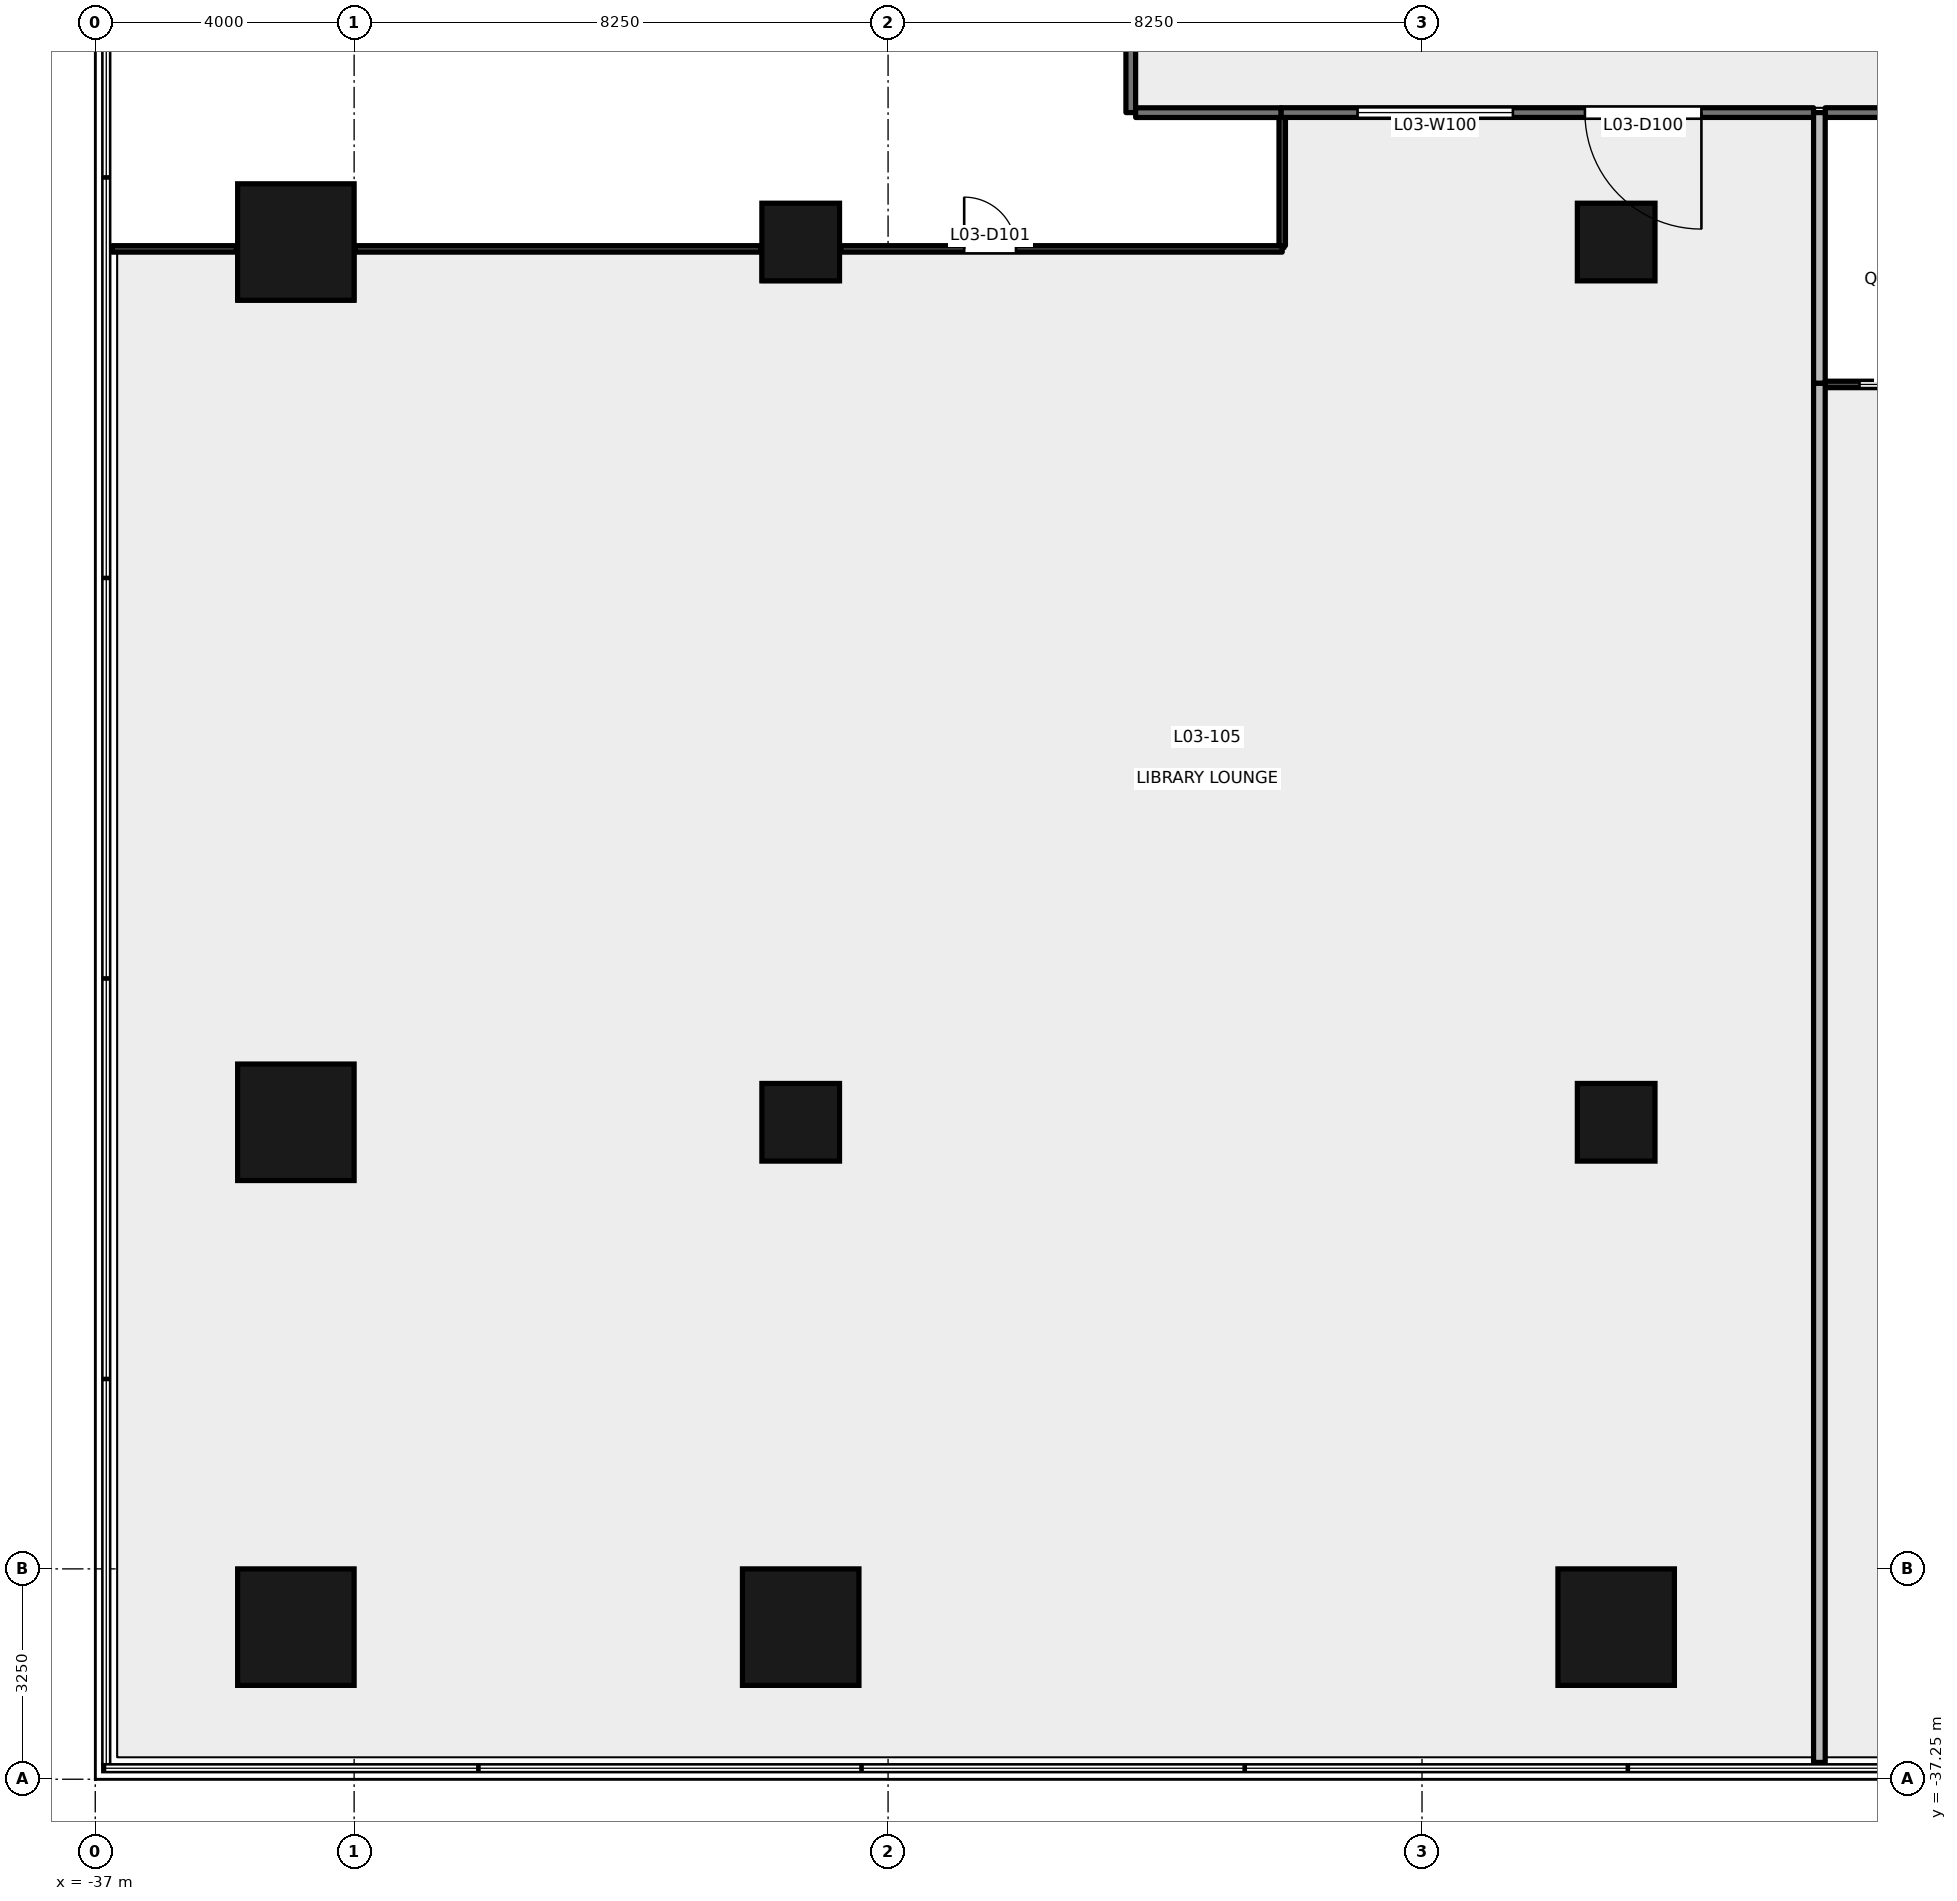
"""IFC4 building model, lengths in metres.
Left out: names, types, materials, properties, quantities, classifications, styles, units other than length and angle.
Written with IfcOpenShell. Run it as: python <this file> out.ifc"""

import sys

from ifc_helpers import new_model, si_unit, direction, frame, frame_2d, origin, origin_2d, place, context, subcontext, project, spatial, rectangle, extrude, element, fill, save


model = new_model("IFC4")
c1 = context("Model", 3, precision=1e-05, world=origin(), true_north=direction((0.0, 1.0)))
c2 = subcontext(c1, "Body", "Model", "MODEL_VIEW")
j1 = project(units=[si_unit("LENGTHUNIT", "METRE"), si_unit("PLANEANGLEUNIT", "RADIAN")], contexts=[c1])
p1 = place(None, origin())
s1 = spatial("IfcSite", under=j1, at=p1, CompositionType="ELEMENT")
p2 = place(p1, origin())
s2 = spatial("IfcBuilding", under=s1, at=p2, CompositionType="ELEMENT")
p3 = place(p2, frame((0.0, 0.0, 17.4)))
s3 = spatial("IfcBuildingStorey", under=s2, at=p3, CompositionType="ELEMENT", Elevation=17.4)
for number, where, z_axis, x_axis in (
    (1, (-33.9, -34.9, -0.2), (0.0, 0.0, 1.0), (1.0, 0.0, 0.0)),
    (2, (-26.1, -34.9, -0.2), (0.0, 0.0, 1.0), (1.0, 0.0, 0.0)),
    (3, (-13.5, -34.9, -0.2), (0.0, 0.0, 1.0), (1.0, 0.0, 0.0)),
    (4, (-33.9, -27.1, -0.2), (0.0, 0.0, 1.0), (0.0, 1.0, 0.0)),
    (5, (-33.9, -13.5, -0.2), (0.0, 0.0, 1.0), (0.0, 1.0, 0.0)),
):
    element("IfcColumn", number, at=place(p3, frame(where, z_axis=z_axis, x_axis=x_axis)), inside=s3, PredefinedType="COLUMN", context=c2, shape_type="SweptSolid", body=[
        extrude(rectangle(XDim=1.8, YDim=1.8, at=origin_2d()), origin(), (0.0, 0.0, 1.0), 4.8),
    ])
for number, where, z_axis, x_axis in (
    (6, (-26.1, -27.1, -0.2), (0.0, 0.0, 1.0), (1.0, 0.0, 0.0)),
    (7, (-13.5, -27.1, -0.2), (0.0, 0.0, 1.0), (1.0, 0.0, 0.0)),
    (8, (-26.1, -13.5, -0.2), (0.0, 0.0, 1.0), (1.0, 0.0, 0.0)),
    (9, (-13.5, -13.5, -0.2), (0.0, 0.0, 1.0), (1.0, 0.0, 0.0)),
):
    element("IfcColumn", number, at=place(p3, frame(where, z_axis=z_axis, x_axis=x_axis)), inside=s3, PredefinedType="COLUMN", context=c2, shape_type="SweptSolid", body=[
        extrude(rectangle(XDim=1.2, YDim=1.2, at=origin_2d()), origin(), (0.0, 0.0, 1.0), 4.8),
    ])
p4 = place(p3, frame((-10.45, -11.5, 0.0), z_axis=(0.0, 0.0, 1.0), x_axis=(-1.0, 0.0, 0.0)))
e10 = element("IfcWall", 10, at=p4, inside=s3, PredefinedType="PARTITIONING", context=c2, shape_type="SweptSolid", body=[
    extrude(rectangle(XDim=8.23, YDim=0.15, at=frame_2d((4.115, 0.0))), origin(), (0.0, 0.0, 1.0), 3.2),
])
p5 = place(p4, frame((1.733, 0.0, 0.0)))
e11 = element("IfcOpeningElement", 11, at=p5, cuts=e10, PredefinedType="OPENING", context=c2, shape_type="SweptSolid", body=[
    extrude(rectangle(XDim=1.8, YDim=2.1, at=frame_2d((0.9, 1.05))), frame((0.0, 0.085, 0.0), z_axis=(0.0, -1.0, 0.0), x_axis=(1.0, 0.0, 0.0)), (0.0, 0.0, 1.0), 0.171),
])
p6 = place(p4, frame((4.646, 0.0, 0.0)))
e12 = element("IfcOpeningElement", 12, at=p6, cuts=e10, PredefinedType="OPENING", context=c2, shape_type="SweptSolid", body=[
    extrude(rectangle(XDim=2.4, YDim=2.4, at=frame_2d((1.2, 1.2))), frame((0.0, 0.085, 0.0), z_axis=(0.0, -1.0, 0.0), x_axis=(1.0, 0.0, 0.0)), (0.0, 0.0, 1.0), 0.171),
])
p7 = place(p3, frame((-21.0, -11.5, 0.0), z_axis=(0.0, 0.0, 1.0), x_axis=(0.0, 1.0, 0.0)))
e13 = element("IfcWall", 13, at=p7, inside=s3, PredefinedType="PARTITIONING", context=c2, shape_type="SweptSolid", body=[
    extrude(rectangle(XDim=4.1, YDim=0.15, at=frame_2d((2.05, 0.0))), origin(), (0.0, 0.0, 1.0), 4.6),
])
p8 = place(p3, frame((-18.68, -11.501, 0.0), z_axis=(0.0, 0.0, 1.0), x_axis=(-1.0, 0.0, 0.0)))
e14 = element("IfcWall", 14, at=p8, inside=s3, PredefinedType="PARTITIONING", context=c2, shape_type="SweptSolid", body=[
    extrude(rectangle(XDim=2.245, YDim=0.15, at=frame_2d((1.123, 0.0))), origin(), (0.0, 0.0, 1.0), 4.6),
])
p9 = place(p3, frame((-7.38, -11.5, 0.0), z_axis=(0.0, 0.0, 1.0), x_axis=(-1.0, 0.0, 0.0)))
e15 = element("IfcWall", 15, at=p9, inside=s3, PredefinedType="PARTITIONING", context=c2, shape_type="SweptSolid", body=[
    extrude(rectangle(XDim=2.89, YDim=0.15, at=frame_2d((1.445, 0.0))), origin(), (0.0, 0.0, 1.0), 4.3),
])
p10 = place(p3, frame((-36.74, -13.606, 0.0), z_axis=(0.0, 0.0, 1.0), x_axis=(1.0, 0.0, 0.0)))
e16 = element("IfcWall", 16, at=p10, inside=s3, PredefinedType="PARTITIONING", context=c2, shape_type="SweptSolid", body=[
    extrude(rectangle(XDim=1.92, YDim=0.1, at=frame_2d((0.96, 0.0))), origin(), (0.0, 0.0, 1.0), 4.6),
])
p11 = place(p3, frame((-32.98, -13.606, 0.0), z_axis=(0.0, 0.0, 1.0), x_axis=(1.0, 0.0, 0.0)))
e17 = element("IfcWall", 17, at=p11, inside=s3, PredefinedType="PARTITIONING", context=c2, shape_type="SweptSolid", body=[
    extrude(rectangle(XDim=6.26, YDim=0.1, at=frame_2d((3.13, 0.0))), origin(), (0.0, 0.0, 1.0), 3.6),
])
p12 = place(p3, frame((-25.48, -13.606, 0.0), z_axis=(0.0, 0.0, 1.0), x_axis=(1.0, 0.0, 0.0)))
e18 = element("IfcWall", 18, at=p12, inside=s3, PredefinedType="PARTITIONING", context=c2, shape_type="SweptSolid", body=[
    extrude(rectangle(XDim=6.82, YDim=0.1, at=frame_2d((3.41, 0.0))), origin(), (0.0, 0.0, 1.0), 3.6),
])
p13 = place(p12, frame((1.906, 0.0, 0.0)))
e19 = element("IfcOpeningElement", 19, at=p13, cuts=e18, PredefinedType="OPENING", context=c2, shape_type="SweptSolid", body=[
    extrude(rectangle(XDim=0.8, YDim=2.1, at=frame_2d((0.4, 1.05))), frame((0.0, 0.061, 0.0), z_axis=(0.0, -1.0, 0.0), x_axis=(1.0, 0.0, 0.0)), (0.0, 0.0, 1.0), 0.121),
])
p14 = place(p3, frame((-18.66, -13.556, 0.0), z_axis=(0.0, 0.0, 1.0), x_axis=(0.0, 1.0, 0.0)))
e20 = element("IfcWall", 20, at=p14, inside=s3, PredefinedType="PARTITIONING", context=c2, shape_type="SweptSolid", body=[
    extrude(rectangle(XDim=1.981, YDim=0.1, at=frame_2d((0.99, 0.0))), origin(), (0.0, 0.0, 1.0), 3.6),
])
p15 = place(p3, frame((-10.36, -15.68, 0.0), z_axis=(0.0, 0.0, 1.0), x_axis=(0.0, -1.0, 0.0)))
e21 = element("IfcWall", 21, at=p15, inside=s3, PredefinedType="PARTITIONING", context=c2, shape_type="SweptSolid", body=[
    extrude(rectangle(XDim=21.31, YDim=0.18, at=frame_2d((10.655, 0.0))), origin(), (0.0, 0.0, 1.0), 3.6),
])
p16 = place(p3, frame((-10.36, -11.5, 0.0), z_axis=(0.0, 0.0, 1.0), x_axis=(0.0, -1.0, 0.0)))
e22 = element("IfcWall", 22, at=p16, inside=s3, PredefinedType="PARTITIONING", context=c2, shape_type="SweptSolid", body=[
    extrude(rectangle(XDim=4.18, YDim=0.18, at=frame_2d((2.09, 0.0))), origin(), (0.0, 0.0, 1.0), 3.6),
])
p17 = place(p3, frame((-10.27, -15.7, 0.0), z_axis=(0.0, 0.0, 1.0), x_axis=(1.0, 0.0, 0.0)))
e23 = element("IfcWall", 23, at=p17, inside=s3, PredefinedType="PARTITIONING", context=c2, shape_type="SweptSolid", body=[
    extrude(rectangle(XDim=2.86, YDim=0.1, at=frame_2d((1.43, 0.0))), origin(), (0.0, 0.0, 1.0), 3.99),
])
p18 = place(p17, frame((0.53, 0.0, 0.9)))
e24 = element("IfcOpeningElement", 24, at=p18, cuts=e23, PredefinedType="OPENING", context=c2, shape_type="SweptSolid", body=[
    extrude(rectangle(XDim=1.8, YDim=1.2, at=frame_2d((0.9, 0.6))), frame((0.0, 0.061, 0.0), z_axis=(0.0, -1.0, 0.0), x_axis=(1.0, 0.0, 0.0)), (0.0, 0.0, 1.0), 0.121),
])
p19 = place(p5, origin())
e25 = element("IfcDoor", 25, at=p19, inside=s3, OperationType="DOUBLE_DOOR_SINGLE_SWING", PredefinedType="DOOR", context=c2, shape_type="SweptSolid", body=[
    extrude(rectangle(XDim=1.8, YDim=2.1, at=frame_2d((0.9, 1.05))), frame((0.0, 0.025, 0.0), z_axis=(0.0, -1.0, 0.0), x_axis=(1.0, 0.0, 0.0)), (0.0, 0.0, 1.0), 0.05),
])
fill(e11, e25)
p20 = place(p13, origin())
e26 = element("IfcDoor", 26, at=p20, inside=s3, OperationType="SINGLE_SWING_LEFT", PredefinedType="DOOR", context=c2, shape_type="SweptSolid", body=[
    extrude(rectangle(XDim=0.8, YDim=2.1, at=frame_2d((0.4, 1.05))), frame((0.0, 0.025, 0.0), z_axis=(0.0, -1.0, 0.0), x_axis=(1.0, 0.0, 0.0)), (0.0, 0.0, 1.0), 0.05),
])
fill(e19, e26)
p21 = place(p6, origin())
e27 = element("IfcWindow", 27, at=p21, inside=s3, PartitioningType="SINGLE_PANEL", PredefinedType="WINDOW", context=c2, shape_type="SweptSolid", body=[
    extrude(rectangle(XDim=2.4, YDim=2.4, at=frame_2d((1.2, 1.2))), frame((0.0, 0.03, 0.0), z_axis=(0.0, -1.0, 0.0), x_axis=(1.0, 0.0, 0.0)), (0.0, 0.0, 1.0), 0.06),
])
fill(e12, e27)
p22 = place(p18, origin())
e28 = element("IfcWindow", 28, at=p22, inside=s3, PartitioningType="SINGLE_PANEL", PredefinedType="WINDOW", context=c2, shape_type="SweptSolid", body=[
    extrude(rectangle(XDim=1.8, YDim=1.2, at=frame_2d((0.9, 0.6))), frame((0.0, 0.03, 0.0), z_axis=(0.0, -1.0, 0.0), x_axis=(1.0, 0.0, 0.0)), (0.0, 0.0, 1.0), 0.06),
])
fill(e24, e28)
save(model, sys.argv[1])
